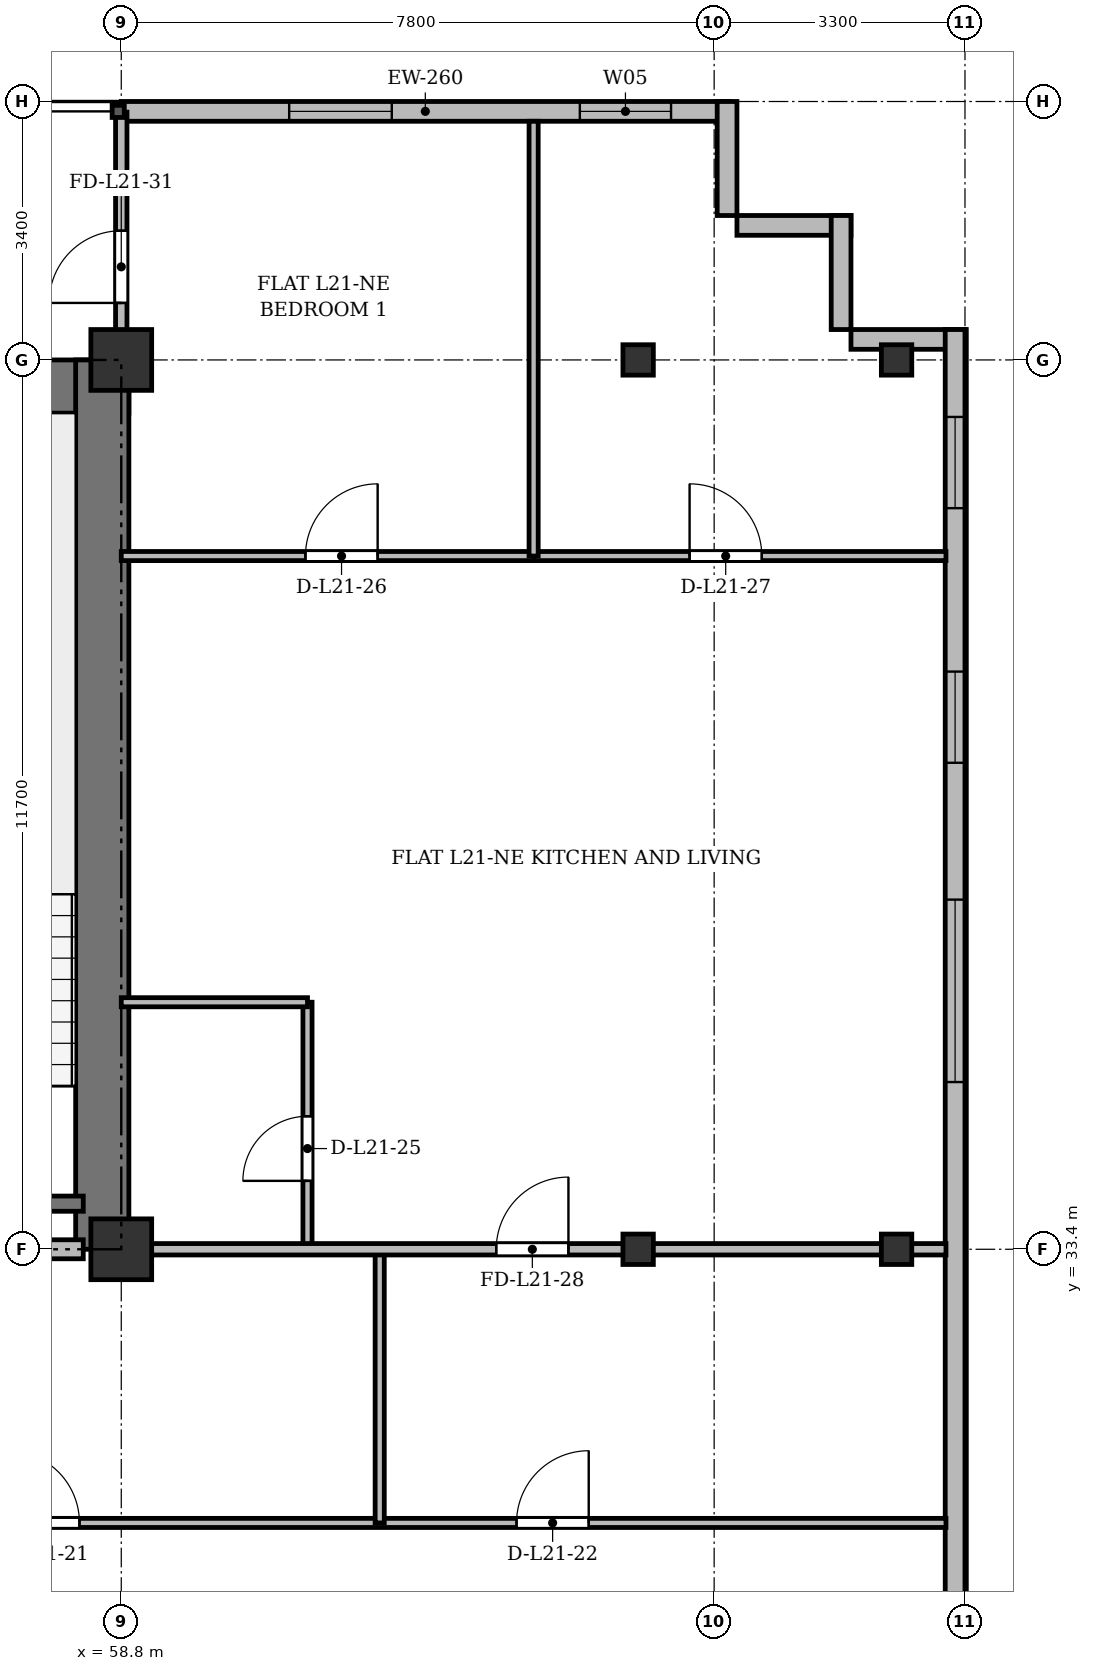
"""IFC4 building model, lengths in metres.
Left out: names, types, materials, properties, quantities, classifications, styles, units other than length and angle.
Written with IfcOpenShell. Run it as: python <this file> out.ifc"""

import sys

from ifc_helpers import new_model, si_unit, direction, frame, frame_2d, origin, origin_2d, place, context, subcontext, project, spatial, rectangle, i_section, extrude, source, transform, mapped, element, fill, save


model = new_model("IFC4")
c1 = context("Model", 3, precision=1e-05, world=origin(), true_north=direction((0.0, 1.0)))
c2 = subcontext(c1, "Body", "Model", "MODEL_VIEW")
j1 = project(units=[si_unit("LENGTHUNIT", "METRE"), si_unit("PLANEANGLEUNIT", "RADIAN")], contexts=[c1])
p1 = place(None, origin())
s1 = spatial("IfcSite", under=j1, at=p1, CompositionType="ELEMENT")
p2 = place(p1, origin())
s2 = spatial("IfcBuilding", under=s1, at=p2, CompositionType="ELEMENT")
p3 = place(p2, frame((0.0, 0.0, 85.3)))
s3 = spatial("IfcBuildingStorey", under=s2, at=p3, CompositionType="ELEMENT", Elevation=85.3)
m1 = source(origin(), c2, "Body", "SweptSolid", [
    extrude(rectangle(XDim=0.8, YDim=0.8, at=origin_2d()), origin(), (0.0, 0.0, 1.0), 3.6),
])
for number, where, z_axis, x_axis in (
    (1, (58.8, 33.4, 0.0), (0.0, 0.0, 1.0), (1.0, 0.0, 0.0)),
    (2, (58.8, 45.1, 0.0), (0.0, 0.0, 1.0), (1.0, 0.0, 0.0)),
):
    element("IfcColumn", number, at=place(p3, frame(where, z_axis=z_axis, x_axis=x_axis)), inside=s3, PredefinedType="COLUMN", context=c2, shape_type="MappedRepresentation", body=[
        mapped(m1, transform((0.0, 0.0, 0.0), x_axis=(1.0, 0.0, 0.0), y_axis=(0.0, 1.0, 0.0), z_axis=(0.0, 0.0, 1.0), scale=1.0)),
    ])
m2 = source(origin(), c2, "Body", "SweptSolid", [
    extrude(i_section(OverallWidth=0.4, OverallDepth=0.4, WebThickness=0.022, FlangeThickness=0.035, at=origin_2d()), origin(), (0.0, 0.0, 1.0), 3.6),
])
for number, where, z_axis, x_axis in (
    (3, (65.6, 33.4, 0.0), (0.0, 0.0, 1.0), (1.0, 0.0, 0.0)),
    (4, (65.6, 45.1, 0.0), (0.0, 0.0, 1.0), (1.0, 0.0, 0.0)),
    (5, (69.0, 33.4, 0.0), (0.0, 0.0, 1.0), (1.0, 0.0, 0.0)),
    (6, (69.0, 45.1, 0.0), (0.0, 0.0, 1.0), (1.0, 0.0, 0.0)),
):
    element("IfcColumn", number, at=place(p3, frame(where, z_axis=z_axis, x_axis=x_axis)), inside=s3, PredefinedType="COLUMN", context=c2, shape_type="MappedRepresentation", body=[
        mapped(m2, transform((0.0, 0.0, 0.0), x_axis=(1.0, 0.0, 0.0), y_axis=(0.0, 1.0, 0.0), z_axis=(0.0, 0.0, 1.0), scale=1.0)),
    ])
p4 = place(p3, frame((58.8, 48.37, 0.0), z_axis=(0.0, 0.0, 1.0), x_axis=(1.0, 0.0, 0.0)))
e7 = element("IfcWall", 7, at=p4, inside=s3, PredefinedType="SOLIDWALL", context=c2, shape_type="SweptSolid", body=[
    extrude(rectangle(XDim=8.0, YDim=0.26, at=frame_2d((4.0, 0.0))), origin(), (0.0, 0.0, 1.0), 3.34),
])
p5 = place(p4, frame((2.209, 0.0, 0.9)))
e8 = element("IfcOpeningElement", 8, at=p5, cuts=e7, PredefinedType="OPENING", context=c2, shape_type="SweptSolid", body=[
    extrude(rectangle(XDim=1.35, YDim=1.5, at=frame_2d((0.675, 0.75))), frame((0.0, 0.14, 0.0), z_axis=(0.0, -1.0, 0.0), x_axis=(1.0, 0.0, 0.0)), (0.0, 0.0, 1.0), 0.28),
])
p6 = place(p4, frame((6.033, 0.0, 0.9)))
e9 = element("IfcOpeningElement", 9, at=p6, cuts=e7, PredefinedType="OPENING", context=c2, shape_type="SweptSolid", body=[
    extrude(rectangle(XDim=1.2, YDim=1.65, at=frame_2d((0.6, 0.825))), frame((0.0, 0.14, 0.0), z_axis=(0.0, -1.0, 0.0), x_axis=(1.0, 0.0, 0.0)), (0.0, 0.0, 1.0), 0.28),
])
for number, where, z_axis, x_axis in (
    (10, (66.77, 48.5, 0.0), (0.0, 0.0, 1.0), (0.0, -1.0, 0.0)),
    (11, (66.9, 46.87, 0.0), (0.0, 0.0, 1.0), (1.0, 0.0, 0.0)),
    (12, (68.27, 47.0, 0.0), (0.0, 0.0, 1.0), (0.0, -1.0, 0.0)),
):
    element("IfcWall", number, at=place(p3, frame(where, z_axis=z_axis, x_axis=x_axis)), inside=s3, PredefinedType="SOLIDWALL", context=c2, shape_type="SweptSolid", body=[
        extrude(rectangle(XDim=1.5, YDim=0.26, at=frame_2d((0.75, 0.0))), origin(), (0.0, 0.0, 1.0), 3.34),
    ])
p7 = place(p3, frame((68.4, 45.37, 0.0), z_axis=(0.0, 0.0, 1.0), x_axis=(1.0, 0.0, 0.0)))
e13 = element("IfcWall", 13, at=p7, inside=s3, PredefinedType="SOLIDWALL", context=c2, shape_type="SweptSolid", body=[
    extrude(rectangle(XDim=1.5, YDim=0.26, at=frame_2d((0.75, 0.0))), origin(), (0.0, 0.0, 1.0), 2.752),
])
p8 = place(p3, frame((69.77, 45.5, 0.0), z_axis=(0.0, 0.0, 1.0), x_axis=(0.0, -1.0, 0.0)))
e14 = element("IfcWall", 14, at=p8, inside=s3, PredefinedType="SOLIDWALL", context=c2, shape_type="SweptSolid", body=[
    extrude(rectangle(XDim=39.6, YDim=0.26, at=frame_2d((19.8, 0.0))), origin(), (0.0, 0.0, 1.0), 3.34),
])
p9 = place(p8, frame((36.95, 0.0, 0.92)))
e15 = element("IfcOpeningElement", 15, at=p9, cuts=e14, PredefinedType="OPENING", context=c2, shape_type="SweptSolid", body=[
    extrude(rectangle(XDim=1.2, YDim=1.65, at=frame_2d((0.6, 0.825))), frame((0.0, 0.14, 0.0), z_axis=(0.0, -1.0, 0.0), x_axis=(1.0, 0.0, 0.0)), (0.0, 0.0, 1.0), 0.28),
])
p10 = place(p8, frame((32.9, 0.0, 0.92)))
e16 = element("IfcOpeningElement", 16, at=p10, cuts=e14, PredefinedType="OPENING", context=c2, shape_type="SweptSolid", body=[
    extrude(rectangle(XDim=2.4, YDim=2.1, at=frame_2d((1.2, 1.05))), frame((0.0, 0.14, 0.0), z_axis=(0.0, -1.0, 0.0), x_axis=(1.0, 0.0, 0.0)), (0.0, 0.0, 1.0), 0.28),
])
p11 = place(p8, frame((28.7, 0.0, 0.92)))
e17 = element("IfcOpeningElement", 17, at=p11, cuts=e14, PredefinedType="OPENING", context=c2, shape_type="SweptSolid", body=[
    extrude(rectangle(XDim=2.4, YDim=2.1, at=frame_2d((1.2, 1.05))), frame((0.0, 0.14, 0.0), z_axis=(0.0, -1.0, 0.0), x_axis=(1.0, 0.0, 0.0)), (0.0, 0.0, 1.0), 0.28),
])
p12 = place(p8, frame((21.5, 0.0, 0.92)))
e18 = element("IfcOpeningElement", 18, at=p12, cuts=e14, PredefinedType="OPENING", context=c2, shape_type="SweptSolid", body=[
    extrude(rectangle(XDim=2.4, YDim=2.1, at=frame_2d((1.2, 1.05))), frame((0.0, 0.14, 0.0), z_axis=(0.0, -1.0, 0.0), x_axis=(1.0, 0.0, 0.0)), (0.0, 0.0, 1.0), 0.28),
])
p13 = place(p8, frame((7.5, 0.0, 0.92)))
e19 = element("IfcOpeningElement", 19, at=p13, cuts=e14, PredefinedType="OPENING", context=c2, shape_type="SweptSolid", body=[
    extrude(rectangle(XDim=2.4, YDim=2.1, at=frame_2d((1.2, 1.05))), frame((0.0, 0.14, 0.0), z_axis=(0.0, -1.0, 0.0), x_axis=(1.0, 0.0, 0.0)), (0.0, 0.0, 1.0), 0.28),
])
p14 = place(p8, frame((4.5, 0.0, 0.92)))
e20 = element("IfcOpeningElement", 20, at=p14, cuts=e14, PredefinedType="OPENING", context=c2, shape_type="SweptSolid", body=[
    extrude(rectangle(XDim=1.2, YDim=1.65, at=frame_2d((0.6, 0.825))), frame((0.0, 0.14, 0.0), z_axis=(0.0, -1.0, 0.0), x_axis=(1.0, 0.0, 0.0)), (0.0, 0.0, 1.0), 0.28),
])
p15 = place(p8, frame((1.15, 0.0, 0.92)))
e21 = element("IfcOpeningElement", 21, at=p15, cuts=e14, PredefinedType="OPENING", context=c2, shape_type="SweptSolid", body=[
    extrude(rectangle(XDim=1.2, YDim=1.65, at=frame_2d((0.6, 0.825))), frame((0.0, 0.14, 0.0), z_axis=(0.0, -1.0, 0.0), x_axis=(1.0, 0.0, 0.0)), (0.0, 0.0, 1.0), 0.28),
])
p16 = place(p3, frame((15.5, 44.75, 0.0), z_axis=(0.0, 0.0, 1.0), x_axis=(1.0, 0.0, 0.0)))
e22 = element("IfcWall", 22, at=p16, inside=s3, PredefinedType="SHEAR", context=c2, shape_type="SweptSolid", body=[
    extrude(rectangle(XDim=43.4, YDim=0.7, at=frame_2d((21.7, 0.0))), origin(), (0.0, 0.0, 1.0), 3.34),
])
p17 = place(p3, frame((58.55, 33.4, 0.0), z_axis=(0.0, 0.0, 1.0), x_axis=(0.0, 1.0, 0.0)))
e23 = element("IfcWall", 23, at=p17, inside=s3, PredefinedType="SHEAR", context=c2, shape_type="SweptSolid", body=[
    extrude(rectangle(XDim=11.7, YDim=0.7, at=frame_2d((5.85, 0.0))), origin(), (0.0, 0.0, 1.0), 3.34),
])
p18 = place(p3, frame((54.9, 34.0, 0.0), z_axis=(0.0, 0.0, 1.0), x_axis=(1.0, 0.0, 0.0)))
e24 = element("IfcWall", 24, at=p18, inside=s3, PredefinedType="SHEAR", context=c2, shape_type="SweptSolid", body=[
    extrude(rectangle(XDim=3.4, YDim=0.2, at=frame_2d((1.7, 0.0))), origin(), (0.0, 0.0, 1.0), 3.34),
])
p19 = place(p3, frame((47.15, 33.4, 0.0), z_axis=(0.0, 0.0, 1.0), x_axis=(1.0, 0.0, 0.0)))
e25 = element("IfcWall", 25, at=p19, inside=s3, PredefinedType="PARTITIONING", context=c2, shape_type="SweptSolid", body=[
    extrude(rectangle(XDim=11.15, YDim=0.25, at=frame_2d((5.575, 0.0))), origin(), (0.0, 0.0, 1.0), 2.752),
])
p20 = place(p19, frame((0.7, 0.0, 0.0)))
e26 = element("IfcOpeningElement", 26, at=p20, cuts=e25, PredefinedType="OPENING", context=c2, shape_type="SweptSolid", body=[
    extrude(rectangle(XDim=0.95, YDim=2.15, at=frame_2d((0.475, 1.075))), frame((0.0, 0.135, 0.0), z_axis=(0.0, -1.0, 0.0), x_axis=(1.0, 0.0, 0.0)), (0.0, 0.0, 1.0), 0.27),
])
p21 = place(p19, frame((6.0, 0.0, 0.0)))
e27 = element("IfcOpeningElement", 27, at=p21, cuts=e25, PredefinedType="OPENING", context=c2, shape_type="SweptSolid", body=[
    extrude(rectangle(XDim=1.2, YDim=2.15, at=frame_2d((0.6, 1.075))), frame((0.0, 0.135, 0.0), z_axis=(0.0, -1.0, 0.0), x_axis=(1.0, 0.0, 0.0)), (0.0, 0.0, 1.0), 0.27),
])
p22 = place(p3, frame((54.8, 29.8, 0.0), z_axis=(0.0, 0.0, 1.0), x_axis=(1.0, 0.0, 0.0)))
e28 = element("IfcWall", 28, at=p22, inside=s3, PredefinedType="PARTITIONING", context=c2, shape_type="SweptSolid", body=[
    extrude(rectangle(XDim=14.85, YDim=0.12, at=frame_2d((7.425, 0.0))), origin(), (0.0, 0.0, 1.0), 2.84),
])
p23 = place(p22, frame((2.5, 0.0, 0.0)))
e29 = element("IfcOpeningElement", 29, at=p23, cuts=e28, PredefinedType="OPENING", context=c2, shape_type="SweptSolid", body=[
    extrude(rectangle(XDim=0.95, YDim=2.15, at=frame_2d((0.475, 1.075))), frame((0.0, 0.07, 0.0), z_axis=(0.0, -1.0, 0.0), x_axis=(1.0, 0.0, 0.0)), (0.0, 0.0, 1.0), 0.14),
])
p24 = place(p22, frame((9.2, 0.0, 0.0)))
e30 = element("IfcOpeningElement", 30, at=p24, cuts=e28, PredefinedType="OPENING", context=c2, shape_type="SweptSolid", body=[
    extrude(rectangle(XDim=0.95, YDim=2.15, at=frame_2d((0.475, 1.075))), frame((0.0, 0.07, 0.0), z_axis=(0.0, -1.0, 0.0), x_axis=(1.0, 0.0, 0.0)), (0.0, 0.0, 1.0), 0.14),
])
p25 = place(p3, frame((62.2, 29.8, 0.0), z_axis=(0.0, 0.0, 1.0), x_axis=(0.0, 1.0, 0.0)))
e31 = element("IfcWall", 31, at=p25, inside=s3, PredefinedType="PARTITIONING", context=c2, shape_type="SweptSolid", body=[
    extrude(rectangle(XDim=3.6, YDim=0.12, at=frame_2d((1.8, 0.0))), origin(), (0.0, 0.0, 1.0), 2.752),
])
p26 = place(p3, frame((61.25, 33.4, 0.0), z_axis=(0.0, 0.0, 1.0), x_axis=(0.0, 1.0, 0.0)))
e32 = element("IfcWall", 32, at=p26, inside=s3, PredefinedType="PARTITIONING", context=c2, shape_type="SweptSolid", body=[
    extrude(rectangle(XDim=3.25, YDim=0.12, at=frame_2d((1.625, 0.0))), origin(), (0.0, 0.0, 1.0), 2.752),
])
p27 = place(p26, frame((0.9, 0.0, 0.0)))
e33 = element("IfcOpeningElement", 33, at=p27, cuts=e32, PredefinedType="OPENING", context=c2, shape_type="SweptSolid", body=[
    extrude(rectangle(XDim=0.85, YDim=2.1, at=frame_2d((0.425, 1.05))), frame((0.0, 0.07, 0.0), z_axis=(0.0, -1.0, 0.0), x_axis=(1.0, 0.0, 0.0)), (0.0, 0.0, 1.0), 0.14),
])
p28 = place(p3, frame((58.8, 36.65, 0.0), z_axis=(0.0, 0.0, 1.0), x_axis=(1.0, 0.0, 0.0)))
e34 = element("IfcWall", 34, at=p28, inside=s3, PredefinedType="PARTITIONING", context=c2, shape_type="SweptSolid", body=[
    extrude(rectangle(XDim=2.45, YDim=0.12, at=frame_2d((1.225, 0.0))), origin(), (0.0, 0.0, 1.0), 2.84),
])
p29 = place(p3, frame((58.8, 42.52, 0.0), z_axis=(0.0, 0.0, 1.0), x_axis=(1.0, 0.0, 0.0)))
e35 = element("IfcWall", 35, at=p29, inside=s3, PredefinedType="PARTITIONING", context=c2, shape_type="SweptSolid", body=[
    extrude(rectangle(XDim=5.425, YDim=0.12, at=frame_2d((2.712, 0.0))), origin(), (0.0, 0.0, 1.0), 2.84),
])
p30 = place(p29, frame((2.423, 0.0, 0.0)))
e36 = element("IfcOpeningElement", 36, at=p30, cuts=e35, PredefinedType="OPENING", context=c2, shape_type="SweptSolid", body=[
    extrude(rectangle(XDim=0.95, YDim=2.15, at=frame_2d((0.475, 1.075))), frame((0.0, 0.07, 0.0), z_axis=(0.0, -1.0, 0.0), x_axis=(1.0, 0.0, 0.0)), (0.0, 0.0, 1.0), 0.14),
])
p31 = place(p3, frame((64.225, 42.52, 0.0), z_axis=(0.0, 0.0, 1.0), x_axis=(1.0, 0.0, 0.0)))
e37 = element("IfcWall", 37, at=p31, inside=s3, PredefinedType="PARTITIONING", context=c2, shape_type="SweptSolid", body=[
    extrude(rectangle(XDim=5.425, YDim=0.12, at=frame_2d((2.712, 0.0))), origin(), (0.0, 0.0, 1.0), 2.84),
])
p32 = place(p31, frame((2.052, 0.0, 0.0)))
e38 = element("IfcOpeningElement", 38, at=p32, cuts=e37, PredefinedType="OPENING", context=c2, shape_type="SweptSolid", body=[
    extrude(rectangle(XDim=0.95, YDim=2.15, at=frame_2d((0.475, 1.075))), frame((0.0, 0.07, 0.0), z_axis=(0.0, -1.0, 0.0), x_axis=(1.0, 0.0, 0.0)), (0.0, 0.0, 1.0), 0.14),
])
p33 = place(p3, frame((64.225, 42.52, 0.0), z_axis=(0.0, 0.0, 1.0), x_axis=(0.0, 1.0, 0.0)))
e39 = element("IfcWall", 39, at=p33, inside=s3, PredefinedType="PARTITIONING", context=c2, shape_type="SweptSolid", body=[
    extrude(rectangle(XDim=5.72, YDim=0.12, at=frame_2d((2.86, 0.0))), origin(), (0.0, 0.0, 1.0), 2.752),
])
p34 = place(p3, frame((58.8, 33.4, 0.0), z_axis=(0.0, 0.0, 1.0), x_axis=(1.0, 0.0, 0.0)))
e40 = element("IfcWall", 40, at=p34, inside=s3, PredefinedType="PARTITIONING", context=c2, shape_type="SweptSolid", body=[
    extrude(rectangle(XDim=10.85, YDim=0.15, at=frame_2d((5.425, 0.0))), origin(), (0.0, 0.0, 1.0), 2.752),
])
p35 = place(p34, frame((4.933, 0.0, 0.0)))
e41 = element("IfcOpeningElement", 41, at=p35, cuts=e40, PredefinedType="OPENING", context=c2, shape_type="SweptSolid", body=[
    extrude(rectangle(XDim=0.95, YDim=2.15, at=frame_2d((0.475, 1.075))), frame((0.0, 0.085, 0.0), z_axis=(0.0, -1.0, 0.0), x_axis=(1.0, 0.0, 0.0)), (0.0, 0.0, 1.0), 0.17),
])
p36 = place(p3, frame((58.8, 44.75, 0.0), z_axis=(0.0, 0.0, 1.0), x_axis=(0.0, 1.0, 0.0)))
e42 = element("IfcWall", 42, at=p36, inside=s3, PredefinedType="PARTITIONING", context=c2, shape_type="SweptSolid", body=[
    extrude(rectangle(XDim=3.61, YDim=0.15, at=frame_2d((1.805, 0.0))), origin(), (0.0, 0.0, 1.0), 2.84),
])
p37 = place(p36, frame((1.1, 0.0, 0.0)))
e43 = element("IfcOpeningElement", 43, at=p37, cuts=e42, PredefinedType="OPENING", context=c2, shape_type="SweptSolid", body=[
    extrude(rectangle(XDim=0.95, YDim=2.15, at=frame_2d((0.475, 1.075))), frame((0.0, 0.085, 0.0), z_axis=(0.0, -1.0, 0.0), x_axis=(1.0, 0.0, 0.0)), (0.0, 0.0, 1.0), 0.17),
])
m3 = source(origin(), c2, "Body", "SweptSolid", [
    extrude(rectangle(XDim=1.35, YDim=1.5, at=frame_2d((0.675, 0.75))), frame((0.0, 0.03, 0.0), z_axis=(0.0, -1.0, 0.0), x_axis=(1.0, 0.0, 0.0)), (0.0, 0.0, 1.0), 0.06),
])
p38 = place(p5, origin())
e44 = element("IfcWindow", 44, at=p38, inside=s3, PartitioningType="SINGLE_PANEL", PredefinedType="WINDOW", context=c2, shape_type="MappedRepresentation", body=[
    mapped(m3, transform((0.0, 0.0, 0.0), x_axis=(1.0, 0.0, 0.0), y_axis=(0.0, 1.0, 0.0), z_axis=(0.0, 0.0, 1.0), scale=1.0)),
])
fill(e8, e44)
m4 = source(origin(), c2, "Body", "SweptSolid", [
    extrude(rectangle(XDim=1.2, YDim=1.65, at=frame_2d((0.6, 0.825))), frame((0.0, 0.03, 0.0), z_axis=(0.0, -1.0, 0.0), x_axis=(1.0, 0.0, 0.0)), (0.0, 0.0, 1.0), 0.06),
])
p39 = place(p6, origin())
e45 = element("IfcWindow", 45, at=p39, inside=s3, PartitioningType="SINGLE_PANEL", PredefinedType="WINDOW", context=c2, shape_type="MappedRepresentation", body=[
    mapped(m4, transform((0.0, 0.0, 0.0), x_axis=(1.0, 0.0, 0.0), y_axis=(0.0, 1.0, 0.0), z_axis=(0.0, 0.0, 1.0), scale=1.0)),
])
fill(e9, e45)
m5 = source(origin(), c2, "Body", "SweptSolid", [
    extrude(rectangle(XDim=2.4, YDim=2.1, at=frame_2d((1.2, 1.05))), frame((0.0, 0.03, 0.0), z_axis=(0.0, -1.0, 0.0), x_axis=(1.0, 0.0, 0.0)), (0.0, 0.0, 1.0), 0.06),
])
p40 = place(p13, origin())
e46 = element("IfcWindow", 46, at=p40, inside=s3, PartitioningType="SINGLE_PANEL", PredefinedType="WINDOW", context=c2, shape_type="MappedRepresentation", body=[
    mapped(m5, transform((0.0, 0.0, 0.0), x_axis=(1.0, 0.0, 0.0), y_axis=(0.0, 1.0, 0.0), z_axis=(0.0, 0.0, 1.0), scale=1.0)),
])
fill(e19, e46)
p41 = place(p14, origin())
e47 = element("IfcWindow", 47, at=p41, inside=s3, PartitioningType="SINGLE_PANEL", PredefinedType="WINDOW", context=c2, shape_type="MappedRepresentation", body=[
    mapped(m4, transform((0.0, 0.0, 0.0), x_axis=(1.0, 0.0, 0.0), y_axis=(0.0, 1.0, 0.0), z_axis=(0.0, 0.0, 1.0), scale=1.0)),
])
fill(e20, e47)
p42 = place(p15, origin())
e48 = element("IfcWindow", 48, at=p42, inside=s3, PartitioningType="SINGLE_PANEL", PredefinedType="WINDOW", context=c2, shape_type="MappedRepresentation", body=[
    mapped(m4, transform((0.0, 0.0, 0.0), x_axis=(1.0, 0.0, 0.0), y_axis=(0.0, 1.0, 0.0), z_axis=(0.0, 0.0, 1.0), scale=1.0)),
])
fill(e21, e48)
m6 = source(origin(), c2, "Body", "SweptSolid", [
    extrude(rectangle(XDim=0.95, YDim=2.15, at=frame_2d((0.475, 1.075))), frame((0.0, 0.025, 0.0), z_axis=(0.0, -1.0, 0.0), x_axis=(1.0, 0.0, 0.0)), (0.0, 0.0, 1.0), 0.05),
])
p43 = place(p23, origin())
e49 = element("IfcDoor", 49, at=p43, inside=s3, OperationType="SINGLE_SWING_LEFT", PredefinedType="DOOR", context=c2, shape_type="MappedRepresentation", body=[
    mapped(m6, transform((0.0, 0.0, 0.0), x_axis=(1.0, 0.0, 0.0), y_axis=(0.0, 1.0, 0.0), z_axis=(0.0, 0.0, 1.0), scale=1.0)),
])
fill(e29, e49)
p44 = place(p24, origin())
e50 = element("IfcDoor", 50, at=p44, inside=s3, OperationType="SINGLE_SWING_RIGHT", PredefinedType="DOOR", context=c2, shape_type="MappedRepresentation", body=[
    mapped(m6, transform((0.0, 0.0, 0.0), x_axis=(1.0, 0.0, 0.0), y_axis=(0.0, 1.0, 0.0), z_axis=(0.0, 0.0, 1.0), scale=1.0)),
])
fill(e30, e50)
m7 = source(origin(), c2, "Body", "SweptSolid", [
    extrude(rectangle(XDim=0.85, YDim=2.1, at=frame_2d((0.425, 1.05))), frame((0.0, 0.025, 0.0), z_axis=(0.0, -1.0, 0.0), x_axis=(1.0, 0.0, 0.0)), (0.0, 0.0, 1.0), 0.05),
])
p45 = place(p27, origin())
e51 = element("IfcDoor", 51, at=p45, inside=s3, OperationType="SINGLE_SWING_LEFT", PredefinedType="DOOR", context=c2, shape_type="MappedRepresentation", body=[
    mapped(m7, transform((0.0, 0.0, 0.0), x_axis=(1.0, 0.0, 0.0), y_axis=(0.0, 1.0, 0.0), z_axis=(0.0, 0.0, 1.0), scale=1.0)),
])
fill(e33, e51)
p46 = place(p30, origin())
e52 = element("IfcDoor", 52, at=p46, inside=s3, OperationType="SINGLE_SWING_RIGHT", PredefinedType="DOOR", context=c2, shape_type="MappedRepresentation", body=[
    mapped(m6, transform((0.0, 0.0, 0.0), x_axis=(1.0, 0.0, 0.0), y_axis=(0.0, 1.0, 0.0), z_axis=(0.0, 0.0, 1.0), scale=1.0)),
])
fill(e36, e52)
p47 = place(p32, origin())
e53 = element("IfcDoor", 53, at=p47, inside=s3, OperationType="SINGLE_SWING_LEFT", PredefinedType="DOOR", context=c2, shape_type="MappedRepresentation", body=[
    mapped(m6, transform((0.0, 0.0, 0.0), x_axis=(1.0, 0.0, 0.0), y_axis=(0.0, 1.0, 0.0), z_axis=(0.0, 0.0, 1.0), scale=1.0)),
])
fill(e38, e53)
p48 = place(p35, origin())
e54 = element("IfcDoor", 54, at=p48, inside=s3, OperationType="SINGLE_SWING_RIGHT", PredefinedType="DOOR", context=c2, shape_type="MappedRepresentation", body=[
    mapped(m6, transform((0.0, 0.0, 0.0), x_axis=(1.0, 0.0, 0.0), y_axis=(0.0, 1.0, 0.0), z_axis=(0.0, 0.0, 1.0), scale=1.0)),
])
fill(e41, e54)
p49 = place(p37, origin())
e55 = element("IfcDoor", 55, at=p49, inside=s3, OperationType="SINGLE_SWING_LEFT", PredefinedType="DOOR", context=c2, shape_type="MappedRepresentation", body=[
    mapped(m6, transform((0.0, 0.0, 0.0), x_axis=(1.0, 0.0, 0.0), y_axis=(0.0, 1.0, 0.0), z_axis=(0.0, 0.0, 1.0), scale=1.0)),
])
fill(e43, e55)
save(model, sys.argv[1])
